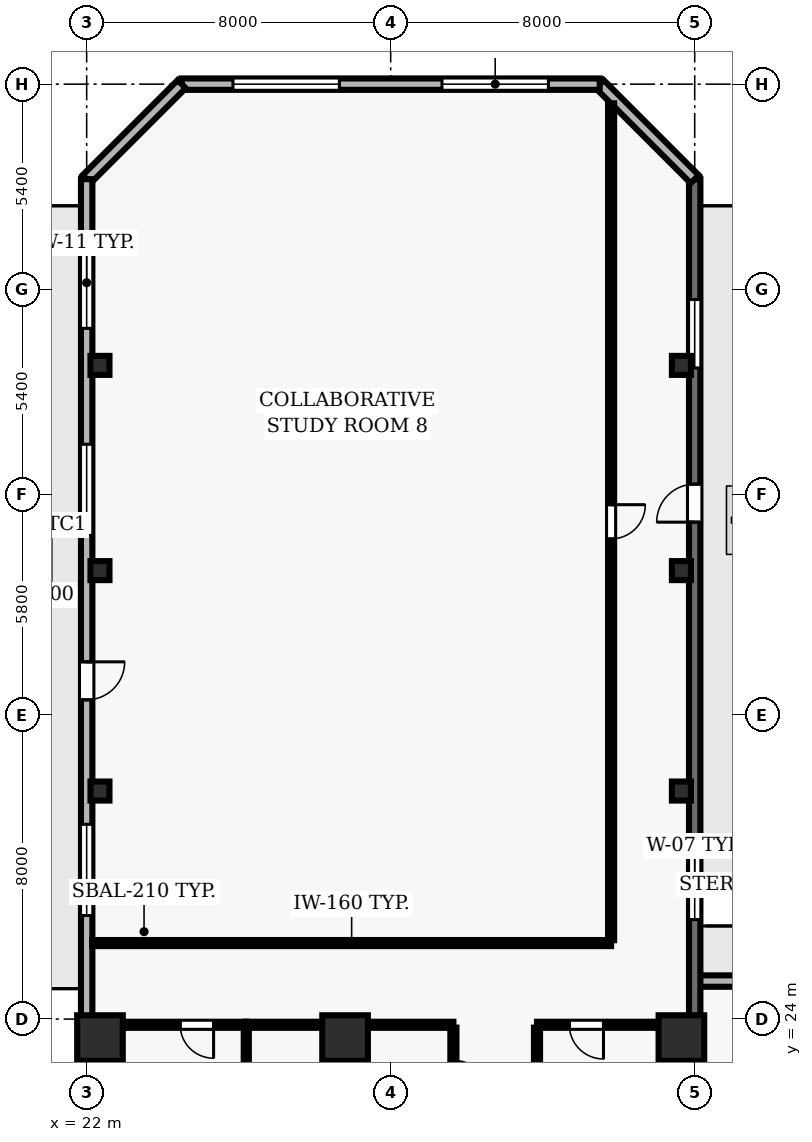
"""IFC4 building model, lengths in metres.
Left out: names, types, materials, properties, quantities, classifications, styles, units other than length and angle.
Written with IfcOpenShell. Run it as: python <this file> out.ifc"""

import sys

from ifc_helpers import new_model, si_unit, direction, frame, frame_2d, origin, origin_2d, place, context, subcontext, project, spatial, rectangle, hollow_rectangle, extrude, element, fill, save


model = new_model("IFC4")
c1 = context("Model", 3, precision=1e-05, world=origin(), true_north=direction((0.0, 1.0)))
c2 = subcontext(c1, "Body", "Model", "MODEL_VIEW")
j1 = project(units=[si_unit("LENGTHUNIT", "METRE"), si_unit("PLANEANGLEUNIT", "RADIAN")], contexts=[c1])
p1 = place(None, origin())
s1 = spatial("IfcSite", under=j1, at=p1, CompositionType="ELEMENT")
p2 = place(p1, origin())
s2 = spatial("IfcBuilding", under=s1, at=p2, CompositionType="ELEMENT")
p3 = place(p2, frame((0.0, 0.0, 142.4)))
s3 = spatial("IfcBuildingStorey", under=s2, at=p3, CompositionType="ELEMENT", Elevation=142.4)
for number, where, z_axis, x_axis in (
    (1, (22.35, 23.5, 0.0), (0.0, 0.0, 1.0), (1.0, 0.0, 0.0)),
    (2, (28.8, 23.5, 0.0), (0.0, 0.0, 1.0), (1.0, 0.0, 0.0)),
    (3, (37.65, 23.5, 0.0), (0.0, 0.0, 1.0), (1.0, 0.0, 0.0)),
):
    element("IfcColumn", number, at=place(p3, frame(where, z_axis=z_axis, x_axis=x_axis)), inside=s3, PredefinedType="COLUMN", context=c2, shape_type="SweptSolid", body=[
        extrude(rectangle(XDim=1.2, YDim=1.2, at=origin_2d()), origin(), (0.0, 0.0, 1.0), 3.9),
    ])
for number, where, z_axis, x_axis in (
    (4, (22.35, 30.0, 0.0), (0.0, 0.0, 1.0), (1.0, 0.0, 0.0)),
    (5, (37.65, 30.0, 0.0), (0.0, 0.0, 1.0), (1.0, 0.0, 0.0)),
    (6, (22.35, 35.8, 0.0), (0.0, 0.0, 1.0), (1.0, 0.0, 0.0)),
    (7, (37.65, 35.8, 0.0), (0.0, 0.0, 1.0), (1.0, 0.0, 0.0)),
    (8, (22.35, 41.2, 0.0), (0.0, 0.0, 1.0), (1.0, 0.0, 0.0)),
    (9, (37.65, 41.2, 0.0), (0.0, 0.0, 1.0), (1.0, 0.0, 0.0)),
):
    element("IfcColumn", number, at=place(p3, frame(where, z_axis=z_axis, x_axis=x_axis)), inside=s3, PredefinedType="COLUMN", context=c2, shape_type="SweptSolid", body=[
        extrude(hollow_rectangle(XDim=0.5, YDim=0.5, WallThickness=0.025, at=origin_2d()), origin(), (0.0, 0.0, 1.0), 3.9),
    ])
p4 = place(p3, frame((44.846, 25.0, 0.0), z_axis=(0.0, 0.0, 1.0), x_axis=(-1.0, 0.0, 0.0)))
e10 = element("IfcWall", 10, at=p4, inside=s3, PredefinedType="SOLIDWALL", context=c2, shape_type="SweptSolid", body=[
    extrude(rectangle(XDim=6.846, YDim=0.3, at=frame_2d((3.423, 0.0))), origin(), (0.0, 0.0, 1.0), 3.69),
])
p5 = place(p4, frame((2.748, 0.0, 0.0)))
e11 = element("IfcOpeningElement", 11, at=p5, cuts=e10, PredefinedType="OPENING", context=c2, shape_type="SweptSolid", body=[
    extrude(rectangle(XDim=1.35, YDim=2.2, at=frame_2d((0.675, 1.1))), frame((0.0, 0.16, 0.0), z_axis=(0.0, -1.0, 0.0), x_axis=(1.0, 0.0, 0.0)), (0.0, 0.0, 1.0), 0.32),
])
p6 = place(p3, frame((38.0, 24.0, 0.0), z_axis=(0.0, 0.0, 1.0), x_axis=(0.0, 1.0, 0.0)))
e12 = element("IfcWall", 12, at=p6, inside=s3, PredefinedType="SOLIDWALL", context=c2, shape_type="SweptSolid", body=[
    extrude(rectangle(XDim=22.1, YDim=0.3, at=frame_2d((11.05, 0.0))), origin(), (0.0, 0.0, 1.0), 3.69),
])
p7 = place(p6, frame((13.075, 0.0, 0.0)))
e13 = element("IfcOpeningElement", 13, at=p7, cuts=e12, PredefinedType="OPENING", context=c2, shape_type="SweptSolid", body=[
    extrude(rectangle(XDim=1.0, YDim=2.2, at=frame_2d((0.5, 1.1))), frame((0.0, 0.16, 0.0), z_axis=(0.0, -1.0, 0.0), x_axis=(1.0, 0.0, 0.0)), (0.0, 0.0, 1.0), 0.32),
])
p8 = place(p6, frame((2.617, 0.0, 0.9)))
e14 = element("IfcOpeningElement", 14, at=p8, cuts=e12, PredefinedType="OPENING", context=c2, shape_type="SweptSolid", body=[
    extrude(rectangle(XDim=1.8, YDim=1.8, at=frame_2d((0.9, 0.9))), frame((0.0, 0.16, 0.0), z_axis=(0.0, -1.0, 0.0), x_axis=(1.0, 0.0, 0.0)), (0.0, 0.0, 1.0), 0.32),
])
p9 = place(p6, frame((17.133, 0.0, 0.9)))
e15 = element("IfcOpeningElement", 15, at=p9, cuts=e12, PredefinedType="OPENING", context=c2, shape_type="SweptSolid", body=[
    extrude(rectangle(XDim=1.8, YDim=1.8, at=frame_2d((0.9, 0.9))), frame((0.0, 0.16, 0.0), z_axis=(0.0, -1.0, 0.0), x_axis=(1.0, 0.0, 0.0)), (0.0, 0.0, 1.0), 0.32),
])
p10 = place(p3, frame((38.0, 46.1, 0.0), z_axis=(0.0, 0.0, 1.0), x_axis=(-0.707106781187, 0.707106781187, 0.0)))
e16 = element("IfcWall", 16, at=p10, inside=s3, PredefinedType="SOLIDWALL", context=c2, shape_type="SweptSolid", body=[
    extrude(rectangle(XDim=3.536, YDim=0.3, at=frame_2d((1.768, 0.0))), origin(), (0.0, 0.0, 1.0), 3.69),
])
p11 = place(p3, frame((35.5, 48.6, 0.0), z_axis=(0.0, 0.0, 1.0), x_axis=(-1.0, 0.0, 0.0)))
e17 = element("IfcWall", 17, at=p11, inside=s3, PredefinedType="SOLIDWALL", context=c2, shape_type="SweptSolid", body=[
    extrude(rectangle(XDim=11.0, YDim=0.3, at=frame_2d((5.5, 0.0))), origin(), (0.0, 0.0, 1.0), 3.69),
])
p12 = place(p11, frame((1.35, 0.0, 0.9)))
e18 = element("IfcOpeningElement", 18, at=p12, cuts=e17, PredefinedType="OPENING", context=c2, shape_type="SweptSolid", body=[
    extrude(rectangle(XDim=2.8, YDim=1.8, at=frame_2d((1.4, 0.9))), frame((0.0, 0.16, 0.0), z_axis=(0.0, -1.0, 0.0), x_axis=(1.0, 0.0, 0.0)), (0.0, 0.0, 1.0), 0.32),
])
p13 = place(p11, frame((6.85, 0.0, 0.9)))
e19 = element("IfcOpeningElement", 19, at=p13, cuts=e17, PredefinedType="OPENING", context=c2, shape_type="SweptSolid", body=[
    extrude(rectangle(XDim=2.8, YDim=1.8, at=frame_2d((1.4, 0.9))), frame((0.0, 0.16, 0.0), z_axis=(0.0, -1.0, 0.0), x_axis=(1.0, 0.0, 0.0)), (0.0, 0.0, 1.0), 0.32),
])
p14 = place(p3, frame((24.5, 48.6, 0.0), z_axis=(0.0, 0.0, 1.0), x_axis=(-0.707106781187, -0.707106781187, 0.0)))
e20 = element("IfcWall", 20, at=p14, inside=s3, PredefinedType="SOLIDWALL", context=c2, shape_type="SweptSolid", body=[
    extrude(rectangle(XDim=3.536, YDim=0.3, at=frame_2d((1.768, 0.0))), origin(), (0.0, 0.0, 1.0), 3.69),
])
p15 = place(p3, frame((22.0, 46.1, 0.0), z_axis=(0.0, 0.0, 1.0), x_axis=(0.0, -1.0, 0.0)))
e21 = element("IfcWall", 21, at=p15, inside=s3, PredefinedType="SOLIDWALL", context=c2, shape_type="SweptSolid", body=[
    extrude(rectangle(XDim=43.6, YDim=0.3, at=frame_2d((21.8, 0.0))), origin(), (0.0, 0.0, 1.0), 3.69),
])
p16 = place(p15, frame((12.7, 0.0, 0.0)))
e22 = element("IfcOpeningElement", 22, at=p16, cuts=e21, PredefinedType="OPENING", context=c2, shape_type="SweptSolid", body=[
    extrude(rectangle(XDim=1.0, YDim=2.2, at=frame_2d((0.5, 1.1))), frame((0.0, 0.16, 0.0), z_axis=(0.0, -1.0, 0.0), x_axis=(1.0, 0.0, 0.0)), (0.0, 0.0, 1.0), 0.32),
])
p17 = place(p15, frame((1.525, 0.0, 0.9)))
e23 = element("IfcOpeningElement", 23, at=p17, cuts=e21, PredefinedType="OPENING", context=c2, shape_type="SweptSolid", body=[
    extrude(rectangle(XDim=2.4, YDim=2.2, at=frame_2d((1.2, 1.1))), frame((0.0, 0.16, 0.0), z_axis=(0.0, -1.0, 0.0), x_axis=(1.0, 0.0, 0.0)), (0.0, 0.0, 1.0), 0.32),
])
p18 = place(p15, frame((6.975, 0.0, 0.9)))
e24 = element("IfcOpeningElement", 24, at=p18, cuts=e21, PredefinedType="OPENING", context=c2, shape_type="SweptSolid", body=[
    extrude(rectangle(XDim=2.4, YDim=2.2, at=frame_2d((1.2, 1.1))), frame((0.0, 0.16, 0.0), z_axis=(0.0, -1.0, 0.0), x_axis=(1.0, 0.0, 0.0)), (0.0, 0.0, 1.0), 0.32),
])
p19 = place(p15, frame((16.975, 0.0, 0.9)))
e25 = element("IfcOpeningElement", 25, at=p19, cuts=e21, PredefinedType="OPENING", context=c2, shape_type="SweptSolid", body=[
    extrude(rectangle(XDim=2.4, YDim=2.2, at=frame_2d((1.2, 1.1))), frame((0.0, 0.16, 0.0), z_axis=(0.0, -1.0, 0.0), x_axis=(1.0, 0.0, 0.0)), (0.0, 0.0, 1.0), 0.32),
])
p20 = place(p15, frame((23.775, 0.0, 0.9)))
e26 = element("IfcOpeningElement", 26, at=p20, cuts=e21, PredefinedType="OPENING", context=c2, shape_type="SweptSolid", body=[
    extrude(rectangle(XDim=2.4, YDim=2.2, at=frame_2d((1.2, 1.1))), frame((0.0, 0.16, 0.0), z_axis=(0.0, -1.0, 0.0), x_axis=(1.0, 0.0, 0.0)), (0.0, 0.0, 1.0), 0.32),
])
p21 = place(p15, frame((27.875, 0.0, 0.9)))
e27 = element("IfcOpeningElement", 27, at=p21, cuts=e21, PredefinedType="OPENING", context=c2, shape_type="SweptSolid", body=[
    extrude(rectangle(XDim=2.4, YDim=2.2, at=frame_2d((1.2, 1.1))), frame((0.0, 0.16, 0.0), z_axis=(0.0, -1.0, 0.0), x_axis=(1.0, 0.0, 0.0)), (0.0, 0.0, 1.0), 0.32),
])
p22 = place(p15, frame((34.225, 0.0, 0.9)))
e28 = element("IfcOpeningElement", 28, at=p22, cuts=e21, PredefinedType="OPENING", context=c2, shape_type="SweptSolid", body=[
    extrude(rectangle(XDim=2.4, YDim=2.2, at=frame_2d((1.2, 1.1))), frame((0.0, 0.16, 0.0), z_axis=(0.0, -1.0, 0.0), x_axis=(1.0, 0.0, 0.0)), (0.0, 0.0, 1.0), 0.32),
])
p23 = place(p3, frame((26.2, 23.85, 0.0), z_axis=(0.0, 0.0, 1.0), x_axis=(-1.0, 0.0, 0.0)))
e29 = element("IfcWall", 29, at=p23, inside=s3, PredefinedType="PARTITIONING", context=c2, shape_type="SweptSolid", body=[
    extrude(rectangle(XDim=4.0, YDim=0.16, at=frame_2d((2.0, 0.0))), origin(), (0.0, 0.0, 1.0), 3.074),
])
p24 = place(p23, frame((0.86, 0.0, 0.0)))
e30 = element("IfcOpeningElement", 30, at=p24, cuts=e29, PredefinedType="OPENING", context=c2, shape_type="SweptSolid", body=[
    extrude(rectangle(XDim=0.88, YDim=2.1, at=frame_2d((0.44, 1.05))), frame((0.0, 0.09, 0.0), z_axis=(0.0, -1.0, 0.0), x_axis=(1.0, 0.0, 0.0)), (0.0, 0.0, 1.0), 0.18),
])
p25 = place(p3, frame((31.65, 23.85, 0.0), z_axis=(0.0, 0.0, 1.0), x_axis=(-1.0, 0.0, 0.0)))
e31 = element("IfcWall", 31, at=p25, inside=s3, PredefinedType="PARTITIONING", context=c2, shape_type="SweptSolid", body=[
    extrude(rectangle(XDim=5.45, YDim=0.16, at=frame_2d((2.725, 0.0))), origin(), (0.0, 0.0, 1.0), 3.074),
])
p26 = place(p3, frame((35.8, 26.0, 0.0), z_axis=(0.0, 0.0, 1.0), x_axis=(-1.0, 0.0, 0.0)))
e32 = element("IfcWall", 32, at=p26, inside=s3, PredefinedType="PARTITIONING", context=c2, shape_type="SweptSolid", body=[
    extrude(rectangle(XDim=13.655, YDim=0.16, at=frame_2d((6.828, 0.0))), origin(), (0.0, 0.0, 1.0), 3.69),
])
p27 = place(p3, frame((37.85, 23.85, 0.0), z_axis=(0.0, 0.0, 1.0), x_axis=(-1.0, 0.0, 0.0)))
e33 = element("IfcWall", 33, at=p27, inside=s3, PredefinedType="PARTITIONING", context=c2, shape_type="SweptSolid", body=[
    extrude(rectangle(XDim=4.0, YDim=0.16, at=frame_2d((2.0, 0.0))), origin(), (0.0, 0.0, 1.0), 3.074),
])
p28 = place(p27, frame((2.25, 0.0, 0.0)))
e34 = element("IfcOpeningElement", 34, at=p28, cuts=e33, PredefinedType="OPENING", context=c2, shape_type="SweptSolid", body=[
    extrude(rectangle(XDim=0.9, YDim=2.1, at=frame_2d((0.45, 1.05))), frame((0.0, 0.09, 0.0), z_axis=(0.0, -1.0, 0.0), x_axis=(1.0, 0.0, 0.0)), (0.0, 0.0, 1.0), 0.18),
])
p29 = place(p3, frame((26.2, 23.775, 0.0), z_axis=(0.0, 0.0, 1.0), x_axis=(0.0, -1.0, 0.0)))
e35 = element("IfcWall", 35, at=p29, inside=s3, PredefinedType="PARTITIONING", context=c2, shape_type="SweptSolid", body=[
    extrude(rectangle(XDim=2.662, YDim=0.135, at=frame_2d((1.331, 0.0))), origin(), (0.0, 0.0, 1.0), 3.69),
])
p30 = place(p3, frame((31.65, 23.775, 0.0), z_axis=(0.0, 0.0, 1.0), x_axis=(0.0, -1.0, 0.0)))
e36 = element("IfcWall", 36, at=p30, inside=s3, PredefinedType="PARTITIONING", context=c2, shape_type="SweptSolid", body=[
    extrude(rectangle(XDim=2.725, YDim=0.16, at=frame_2d((1.362, 0.0))), origin(), (0.0, 0.0, 1.0), 3.69),
])
p31 = place(p30, frame((0.862, 0.0, 0.0)))
e37 = element("IfcOpeningElement", 37, at=p31, cuts=e36, PredefinedType="OPENING", context=c2, shape_type="SweptSolid", body=[
    extrude(rectangle(XDim=1.0, YDim=2.1, at=frame_2d((0.5, 1.05))), frame((0.0, 0.09, 0.0), z_axis=(0.0, -1.0, 0.0), x_axis=(1.0, 0.0, 0.0)), (0.0, 0.0, 1.0), 0.18),
])
p32 = place(p3, frame((33.85, 21.025, 0.0), z_axis=(0.0, 0.0, 1.0), x_axis=(0.0, 1.0, 0.0)))
e38 = element("IfcWall", 38, at=p32, inside=s3, PredefinedType="PARTITIONING", context=c2, shape_type="SweptSolid", body=[
    extrude(rectangle(XDim=2.75, YDim=0.16, at=frame_2d((1.375, 0.0))), origin(), (0.0, 0.0, 1.0), 3.69),
])
p33 = place(p3, frame((35.8, 48.095, 0.0), z_axis=(0.0, 0.0, 1.0), x_axis=(0.0, -1.0, 0.0)))
e39 = element("IfcWall", 39, at=p33, inside=s3, PredefinedType="PARTITIONING", context=c2, shape_type="SweptSolid", body=[
    extrude(rectangle(XDim=22.02, YDim=0.16, at=frame_2d((11.01, 0.0))), origin(), (0.0, 0.0, 1.0), 3.69),
])
p34 = place(p33, frame((10.56, 0.0, 0.0)))
e40 = element("IfcOpeningElement", 40, at=p34, cuts=e39, PredefinedType="OPENING", context=c2, shape_type="SweptSolid", body=[
    extrude(rectangle(XDim=0.9, YDim=2.1, at=frame_2d((0.45, 1.05))), frame((0.0, 0.09, 0.0), z_axis=(0.0, -1.0, 0.0), x_axis=(1.0, 0.0, 0.0)), (0.0, 0.0, 1.0), 0.18),
])
p35 = place(p3, frame((37.85, 21.0, 0.0), z_axis=(0.0, 0.0, 1.0), x_axis=(0.0, 1.0, 0.0)))
e41 = element("IfcWall", 41, at=p35, inside=s3, PredefinedType="PARTITIONING", context=c2, shape_type="SweptSolid", body=[
    extrude(rectangle(XDim=2.775, YDim=0.125, at=frame_2d((1.387, 0.0))), origin(), (0.0, 0.0, 1.0), 3.074),
])
p36 = place(p3, frame((38.05, 24.0, 0.0), z_axis=(0.0, 0.0, 1.0), x_axis=(0.0, -1.0, 0.0)))
e42 = element("IfcWall", 42, at=p36, inside=s3, PredefinedType="PARTITIONING", context=c2, shape_type="SweptSolid", body=[
    extrude(rectangle(XDim=7.925, YDim=0.125, at=frame_2d((3.962, 0.0))), origin(), (0.0, 0.0, 1.0), 3.074),
])
p37 = place(p7, origin())
e43 = element("IfcDoor", 43, at=p37, inside=s3, OperationType="SINGLE_SWING_LEFT", PredefinedType="DOOR", context=c2, shape_type="SweptSolid", body=[
    extrude(rectangle(XDim=1.0, YDim=2.2, at=frame_2d((0.5, 1.1))), frame((0.0, 0.025, 0.0), z_axis=(0.0, -1.0, 0.0), x_axis=(1.0, 0.0, 0.0)), (0.0, 0.0, 1.0), 0.05),
])
fill(e13, e43)
p38 = place(p8, origin())
e44 = element("IfcWindow", 44, at=p38, inside=s3, PartitioningType="SINGLE_PANEL", PredefinedType="WINDOW", context=c2, shape_type="SweptSolid", body=[
    extrude(rectangle(XDim=1.8, YDim=1.8, at=frame_2d((0.9, 0.9))), frame((0.0, 0.03, 0.0), z_axis=(0.0, -1.0, 0.0), x_axis=(1.0, 0.0, 0.0)), (0.0, 0.0, 1.0), 0.06),
])
fill(e14, e44)
p39 = place(p9, origin())
e45 = element("IfcWindow", 45, at=p39, inside=s3, PartitioningType="SINGLE_PANEL", PredefinedType="WINDOW", context=c2, shape_type="SweptSolid", body=[
    extrude(rectangle(XDim=1.8, YDim=1.8, at=frame_2d((0.9, 0.9))), frame((0.0, 0.03, 0.0), z_axis=(0.0, -1.0, 0.0), x_axis=(1.0, 0.0, 0.0)), (0.0, 0.0, 1.0), 0.06),
])
fill(e15, e45)
p40 = place(p12, origin())
e46 = element("IfcWindow", 46, at=p40, inside=s3, PartitioningType="SINGLE_PANEL", PredefinedType="WINDOW", context=c2, shape_type="SweptSolid", body=[
    extrude(rectangle(XDim=2.8, YDim=1.8, at=frame_2d((1.4, 0.9))), frame((0.0, 0.03, 0.0), z_axis=(0.0, -1.0, 0.0), x_axis=(1.0, 0.0, 0.0)), (0.0, 0.0, 1.0), 0.06),
])
fill(e18, e46)
p41 = place(p13, origin())
e47 = element("IfcWindow", 47, at=p41, inside=s3, PartitioningType="SINGLE_PANEL", PredefinedType="WINDOW", context=c2, shape_type="SweptSolid", body=[
    extrude(rectangle(XDim=2.8, YDim=1.8, at=frame_2d((1.4, 0.9))), frame((0.0, 0.03, 0.0), z_axis=(0.0, -1.0, 0.0), x_axis=(1.0, 0.0, 0.0)), (0.0, 0.0, 1.0), 0.06),
])
fill(e19, e47)
p42 = place(p16, origin())
e48 = element("IfcDoor", 48, at=p42, inside=s3, OperationType="SINGLE_SWING_LEFT", PredefinedType="DOOR", context=c2, shape_type="SweptSolid", body=[
    extrude(rectangle(XDim=1.0, YDim=2.2, at=frame_2d((0.5, 1.1))), frame((0.0, 0.025, 0.0), z_axis=(0.0, -1.0, 0.0), x_axis=(1.0, 0.0, 0.0)), (0.0, 0.0, 1.0), 0.05),
])
fill(e22, e48)
p43 = place(p17, origin())
e49 = element("IfcWindow", 49, at=p43, inside=s3, PartitioningType="SINGLE_PANEL", PredefinedType="WINDOW", context=c2, shape_type="SweptSolid", body=[
    extrude(rectangle(XDim=2.4, YDim=2.2, at=frame_2d((1.2, 1.1))), frame((0.0, 0.03, 0.0), z_axis=(0.0, -1.0, 0.0), x_axis=(1.0, 0.0, 0.0)), (0.0, 0.0, 1.0), 0.06),
])
fill(e23, e49)
p44 = place(p18, origin())
e50 = element("IfcWindow", 50, at=p44, inside=s3, PartitioningType="SINGLE_PANEL", PredefinedType="WINDOW", context=c2, shape_type="SweptSolid", body=[
    extrude(rectangle(XDim=2.4, YDim=2.2, at=frame_2d((1.2, 1.1))), frame((0.0, 0.03, 0.0), z_axis=(0.0, -1.0, 0.0), x_axis=(1.0, 0.0, 0.0)), (0.0, 0.0, 1.0), 0.06),
])
fill(e24, e50)
p45 = place(p19, origin())
e51 = element("IfcWindow", 51, at=p45, inside=s3, PartitioningType="SINGLE_PANEL", PredefinedType="WINDOW", context=c2, shape_type="SweptSolid", body=[
    extrude(rectangle(XDim=2.4, YDim=2.2, at=frame_2d((1.2, 1.1))), frame((0.0, 0.03, 0.0), z_axis=(0.0, -1.0, 0.0), x_axis=(1.0, 0.0, 0.0)), (0.0, 0.0, 1.0), 0.06),
])
fill(e25, e51)
p46 = place(p28, origin())
e52 = element("IfcDoor", 52, at=p46, inside=s3, OperationType="SINGLE_SWING_LEFT", PredefinedType="DOOR", context=c2, shape_type="SweptSolid", body=[
    extrude(rectangle(XDim=0.9, YDim=2.1, at=frame_2d((0.45, 1.05))), frame((0.0, 0.025, 0.0), z_axis=(0.0, -1.0, 0.0), x_axis=(1.0, 0.0, 0.0)), (0.0, 0.0, 1.0), 0.05),
])
fill(e34, e52)
p47 = place(p31, origin())
e53 = element("IfcDoor", 53, at=p47, inside=s3, OperationType="SINGLE_SWING_RIGHT", PredefinedType="DOOR", context=c2, shape_type="SweptSolid", body=[
    extrude(rectangle(XDim=1.0, YDim=2.1, at=frame_2d((0.5, 1.05))), frame((0.0, 0.025, 0.0), z_axis=(0.0, -1.0, 0.0), x_axis=(1.0, 0.0, 0.0)), (0.0, 0.0, 1.0), 0.05),
])
fill(e37, e53)
p48 = place(p24, origin())
e54 = element("IfcDoor", 54, at=p48, inside=s3, OperationType="SINGLE_SWING_LEFT", PredefinedType="DOOR", context=c2, shape_type="SweptSolid", body=[
    extrude(rectangle(XDim=0.88, YDim=2.1, at=frame_2d((0.44, 1.05))), frame((0.0, 0.025, 0.0), z_axis=(0.0, -1.0, 0.0), x_axis=(1.0, 0.0, 0.0)), (0.0, 0.0, 1.0), 0.05),
])
fill(e30, e54)
p49 = place(p34, origin())
e55 = element("IfcDoor", 55, at=p49, inside=s3, OperationType="SINGLE_SWING_LEFT", PredefinedType="DOOR", context=c2, shape_type="SweptSolid", body=[
    extrude(rectangle(XDim=0.9, YDim=2.1, at=frame_2d((0.45, 1.05))), frame((0.0, 0.025, 0.0), z_axis=(0.0, -1.0, 0.0), x_axis=(1.0, 0.0, 0.0)), (0.0, 0.0, 1.0), 0.05),
])
fill(e40, e55)
save(model, sys.argv[1])
